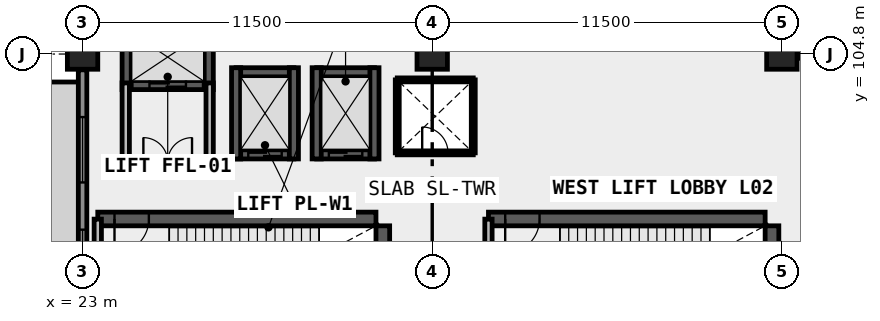
"""IFC4 building model, lengths in metres.
Left out: names, types, materials, properties, quantities, classifications, styles, units other than length and angle.
Written with IfcOpenShell. Run it as: python <this file> out.ifc"""

import sys

from ifc_helpers import new_model, si_unit, direction, frame, frame_2d, origin, origin_2d, place, context, subcontext, project, spatial, rectangle, extrude, element, fill, save


model = new_model("IFC4")
c1 = context("Model", 3, precision=1e-05, world=origin(), true_north=direction((0.0, 1.0)))
c2 = subcontext(c1, "Body", "Model", "MODEL_VIEW")
j1 = project(units=[si_unit("LENGTHUNIT", "METRE"), si_unit("PLANEANGLEUNIT", "RADIAN")], contexts=[c1])
p1 = place(None, origin())
s1 = spatial("IfcSite", under=j1, at=p1, CompositionType="ELEMENT")
p2 = place(p1, origin())
s2 = spatial("IfcBuilding", under=s1, at=p2, CompositionType="ELEMENT")
p3 = place(p2, frame((0.0, 0.0, 8.4)))
s3 = spatial("IfcBuildingStorey", under=s2, at=p3, CompositionType="ELEMENT", Elevation=8.4)
for number, where, z_axis, x_axis in (
    (1, (23.0, 104.8, 0.0), (0.0, 0.0, 1.0), (1.0, 0.0, 0.0)),
    (2, (34.5, 104.8, 0.0), (0.0, 0.0, 1.0), (1.0, 0.0, 0.0)),
    (3, (46.0, 104.8, 0.0), (0.0, 0.0, 1.0), (1.0, 0.0, 0.0)),
):
    element("IfcColumn", number, at=place(p3, frame(where, z_axis=z_axis, x_axis=x_axis)), inside=s3, PredefinedType="COLUMN", context=c2, shape_type="SweptSolid", body=[
        extrude(rectangle(XDim=1.0, YDim=1.0, at=origin_2d()), origin(), (0.0, 0.0, 1.0), 5.4),
    ])
p4 = place(p3, frame((24.45, 103.78, 0.0), z_axis=(0.0, 0.0, 1.0), x_axis=(1.0, 0.0, 0.0)))
e4 = element("IfcWall", 4, at=p4, inside=s3, PredefinedType="SHEAR", context=c2, shape_type="SweptSolid", body=[
    extrude(rectangle(XDim=2.7, YDim=0.3, at=frame_2d((1.35, 0.0))), origin(), (0.0, 0.0, 1.0), 5.4),
])
p5 = place(p4, frame((0.75, 0.0, 0.0)))
e5 = element("IfcOpeningElement", 5, at=p5, cuts=e4, PredefinedType="OPENING", context=c2, shape_type="SweptSolid", body=[
    extrude(rectangle(XDim=1.2, YDim=2.15, at=frame_2d((0.6, 1.075))), frame((0.0, 0.16, 0.0), z_axis=(0.0, -1.0, 0.0), x_axis=(1.0, 0.0, 0.0)), (0.0, 0.0, 1.0), 0.32),
])
for number, where, z_axis, x_axis in (
    (6, (24.45, 103.63, 0.0), (0.0, 0.0, 1.0), (0.0, 1.0, 0.0)),
    (7, (27.15, 103.63, 0.0), (0.0, 0.0, 1.0), (0.0, 1.0, 0.0)),
):
    element("IfcWall", number, at=place(p3, frame(where, z_axis=z_axis, x_axis=x_axis)), inside=s3, PredefinedType="SHEAR", context=c2, shape_type="SweptSolid", body=[
        extrude(rectangle(XDim=2.14, YDim=0.3, at=frame_2d((1.07, 0.0))), origin(), (0.0, 0.0, 1.0), 5.4),
    ])
p6 = place(p3, frame((28.05, 101.5, 0.0), z_axis=(0.0, 0.0, 1.0), x_axis=(1.0, 0.0, 0.0)))
e8 = element("IfcWall", 8, at=p6, inside=s3, PredefinedType="SHEAR", context=c2, shape_type="SweptSolid", body=[
    extrude(rectangle(XDim=1.9, YDim=0.3, at=frame_2d((0.95, 0.0))), origin(), (0.0, 0.0, 1.0), 5.4),
])
p7 = place(p6, frame((0.4, 0.0, 0.0)))
e9 = element("IfcOpeningElement", 9, at=p7, cuts=e8, PredefinedType="OPENING", context=c2, shape_type="SweptSolid", body=[
    extrude(rectangle(XDim=1.1, YDim=2.15, at=frame_2d((0.55, 1.075))), frame((0.0, 0.16, 0.0), z_axis=(0.0, -1.0, 0.0), x_axis=(1.0, 0.0, 0.0)), (0.0, 0.0, 1.0), 0.32),
])
p8 = place(p3, frame((28.05, 104.2, 0.0), z_axis=(0.0, 0.0, 1.0), x_axis=(1.0, 0.0, 0.0)))
e10 = element("IfcWall", 10, at=p8, inside=s3, PredefinedType="SHEAR", context=c2, shape_type="SweptSolid", body=[
    extrude(rectangle(XDim=1.9, YDim=0.3, at=frame_2d((0.95, 0.0))), origin(), (0.0, 0.0, 1.0), 5.4),
])
for number, where, z_axis, x_axis in (
    (11, (28.05, 101.35, 0.0), (0.0, 0.0, 1.0), (0.0, 1.0, 0.0)),
    (12, (29.95, 101.35, 0.0), (0.0, 0.0, 1.0), (0.0, 1.0, 0.0)),
):
    element("IfcWall", number, at=place(p3, frame(where, z_axis=z_axis, x_axis=x_axis)), inside=s3, PredefinedType="SHEAR", context=c2, shape_type="SweptSolid", body=[
        extrude(rectangle(XDim=3.0, YDim=0.3, at=frame_2d((1.5, 0.0))), origin(), (0.0, 0.0, 1.0), 5.4),
    ])
p9 = place(p3, frame((30.7, 101.5, 0.0), z_axis=(0.0, 0.0, 1.0), x_axis=(1.0, 0.0, 0.0)))
e13 = element("IfcWall", 13, at=p9, inside=s3, PredefinedType="SHEAR", context=c2, shape_type="SweptSolid", body=[
    extrude(rectangle(XDim=1.9, YDim=0.3, at=frame_2d((0.95, 0.0))), origin(), (0.0, 0.0, 1.0), 5.4),
])
p10 = place(p9, frame((0.4, 0.0, 0.0)))
e14 = element("IfcOpeningElement", 14, at=p10, cuts=e13, PredefinedType="OPENING", context=c2, shape_type="SweptSolid", body=[
    extrude(rectangle(XDim=1.1, YDim=2.15, at=frame_2d((0.55, 1.075))), frame((0.0, 0.16, 0.0), z_axis=(0.0, -1.0, 0.0), x_axis=(1.0, 0.0, 0.0)), (0.0, 0.0, 1.0), 0.32),
])
p11 = place(p3, frame((30.7, 104.2, 0.0), z_axis=(0.0, 0.0, 1.0), x_axis=(1.0, 0.0, 0.0)))
e15 = element("IfcWall", 15, at=p11, inside=s3, PredefinedType="SHEAR", context=c2, shape_type="SweptSolid", body=[
    extrude(rectangle(XDim=1.9, YDim=0.3, at=frame_2d((0.95, 0.0))), origin(), (0.0, 0.0, 1.0), 5.4),
])
for number, where, z_axis, x_axis in (
    (16, (30.7, 101.35, 0.0), (0.0, 0.0, 1.0), (0.0, 1.0, 0.0)),
    (17, (32.6, 101.35, 0.0), (0.0, 0.0, 1.0), (0.0, 1.0, 0.0)),
):
    element("IfcWall", number, at=place(p3, frame(where, z_axis=z_axis, x_axis=x_axis)), inside=s3, PredefinedType="SHEAR", context=c2, shape_type="SweptSolid", body=[
        extrude(rectangle(XDim=3.0, YDim=0.3, at=frame_2d((1.5, 0.0))), origin(), (0.0, 0.0, 1.0), 5.4),
    ])
p12 = place(p3, frame((23.5, 99.375, 0.0), z_axis=(0.0, 0.0, 1.0), x_axis=(1.0, 0.0, 0.0)))
e18 = element("IfcWall", 18, at=p12, inside=s3, PredefinedType="SHEAR", context=c2, shape_type="SweptSolid", body=[
    extrude(rectangle(XDim=9.15, YDim=0.45, at=frame_2d((4.575, 0.0))), origin(), (0.0, 0.0, 1.0), 5.4),
])
p13 = place(p12, frame((0.55, 0.0, 0.0)))
e19 = element("IfcOpeningElement", 19, at=p13, cuts=e18, PredefinedType="OPENING", context=c2, shape_type="SweptSolid", body=[
    extrude(rectangle(XDim=1.13, YDim=2.15, at=frame_2d((0.565, 1.075))), frame((0.0, 0.235, 0.0), z_axis=(0.0, -1.0, 0.0), x_axis=(1.0, 0.0, 0.0)), (0.0, 0.0, 1.0), 0.47),
])
p14 = place(p3, frame((32.875, 95.55, 0.0), z_axis=(0.0, 0.0, 1.0), x_axis=(0.0, 1.0, 0.0)))
e20 = element("IfcWall", 20, at=p14, inside=s3, PredefinedType="SHEAR", context=c2, shape_type="SweptSolid", body=[
    extrude(rectangle(XDim=3.6, YDim=0.45, at=frame_2d((1.8, 0.0))), origin(), (0.0, 0.0, 1.0), 5.4),
])
p15 = place(p3, frame((36.35, 99.375, 0.0), z_axis=(0.0, 0.0, 1.0), x_axis=(1.0, 0.0, 0.0)))
e21 = element("IfcWall", 21, at=p15, inside=s3, PredefinedType="SHEAR", context=c2, shape_type="SweptSolid", body=[
    extrude(rectangle(XDim=9.1, YDim=0.45, at=frame_2d((4.55, 0.0))), origin(), (0.0, 0.0, 1.0), 5.4),
])
p16 = place(p15, frame((0.55, 0.0, 0.0)))
e22 = element("IfcOpeningElement", 22, at=p16, cuts=e21, PredefinedType="OPENING", context=c2, shape_type="SweptSolid", body=[
    extrude(rectangle(XDim=1.13, YDim=2.15, at=frame_2d((0.565, 1.075))), frame((0.0, 0.235, 0.0), z_axis=(0.0, -1.0, 0.0), x_axis=(1.0, 0.0, 0.0)), (0.0, 0.0, 1.0), 0.47),
])
p17 = place(p3, frame((45.675, 95.32, 0.0), z_axis=(0.0, 0.0, 1.0), x_axis=(0.0, 1.0, 0.0)))
e23 = element("IfcWall", 23, at=p17, inside=s3, PredefinedType="SHEAR", context=c2, shape_type="SweptSolid", body=[
    extrude(rectangle(XDim=3.83, YDim=0.45, at=frame_2d((1.915, 0.0))), origin(), (0.0, 0.0, 1.0), 5.4),
])
p18 = place(p3, frame((46.52, 104.8, 0.0), z_axis=(0.0, 0.0, 1.0), x_axis=(1.0, 0.0, 0.0)))
e24 = element("IfcWall", 24, at=p18, inside=s3, PredefinedType="SOLIDWALL", context=c2, shape_type="SweptSolid", body=[
    extrude(rectangle(XDim=10.46, YDim=0.28, at=frame_2d((5.23, 0.0))), origin(), (0.0, 0.0, 1.0), 4.35),
])
p19 = place(p18, frame((1.002, 0.0, 0.85)))
e25 = element("IfcOpeningElement", 25, at=p19, cuts=e24, PredefinedType="OPENING", context=c2, shape_type="SweptSolid", body=[
    extrude(rectangle(XDim=2.15, YDim=1.95, at=frame_2d((1.075, 0.975))), frame((0.0, 0.15, 0.0), z_axis=(0.0, -1.0, 0.0), x_axis=(1.0, 0.0, 0.0)), (0.0, 0.0, 1.0), 0.3),
])
p20 = place(p18, frame((4.155, 0.0, 0.85)))
e26 = element("IfcOpeningElement", 26, at=p20, cuts=e24, PredefinedType="OPENING", context=c2, shape_type="SweptSolid", body=[
    extrude(rectangle(XDim=2.15, YDim=1.95, at=frame_2d((1.075, 0.975))), frame((0.0, 0.15, 0.0), z_axis=(0.0, -1.0, 0.0), x_axis=(1.0, 0.0, 0.0)), (0.0, 0.0, 1.0), 0.3),
])
p21 = place(p18, frame((7.308, 0.0, 0.85)))
e27 = element("IfcOpeningElement", 27, at=p21, cuts=e24, PredefinedType="OPENING", context=c2, shape_type="SweptSolid", body=[
    extrude(rectangle(XDim=2.15, YDim=1.95, at=frame_2d((1.075, 0.975))), frame((0.0, 0.15, 0.0), z_axis=(0.0, -1.0, 0.0), x_axis=(1.0, 0.0, 0.0)), (0.0, 0.0, 1.0), 0.3),
])
p22 = place(p3, frame((23.0, 95.32, 0.0), z_axis=(0.0, 0.0, 1.0), x_axis=(0.0, 1.0, 0.0)))
e28 = element("IfcWall", 28, at=p22, inside=s3, PredefinedType="SOLIDWALL", context=c2, shape_type="SweptSolid", body=[
    extrude(rectangle(XDim=8.96, YDim=0.28, at=frame_2d((4.48, 0.0))), origin(), (0.0, 0.0, 1.0), 4.35),
])
p23 = place(p22, frame((1.553, 0.0, 0.85)))
e29 = element("IfcOpeningElement", 29, at=p23, cuts=e28, PredefinedType="OPENING", context=c2, shape_type="SweptSolid", body=[
    extrude(rectangle(XDim=2.15, YDim=1.95, at=frame_2d((1.075, 0.975))), frame((0.0, 0.15, 0.0), z_axis=(0.0, -1.0, 0.0), x_axis=(1.0, 0.0, 0.0)), (0.0, 0.0, 1.0), 0.3),
])
p24 = place(p22, frame((5.257, 0.0, 0.85)))
e30 = element("IfcOpeningElement", 30, at=p24, cuts=e28, PredefinedType="OPENING", context=c2, shape_type="SweptSolid", body=[
    extrude(rectangle(XDim=2.15, YDim=1.95, at=frame_2d((1.075, 0.975))), frame((0.0, 0.15, 0.0), z_axis=(0.0, -1.0, 0.0), x_axis=(1.0, 0.0, 0.0)), (0.0, 0.0, 1.0), 0.3),
])
p25 = place(p3, frame((23.5, 95.33, 0.0), z_axis=(0.0, 0.0, 1.0), x_axis=(0.0, 1.0, 0.0)))
e31 = element("IfcWall", 31, at=p25, inside=s3, PredefinedType="SOLIDWALL", context=c2, shape_type="SweptSolid", body=[
    extrude(rectangle(XDim=4.04, YDim=0.24, at=frame_2d((2.02, 0.0))), origin(), (0.0, 0.0, 1.0), 5.12),
])
p26 = place(p25, frame((1.45, 0.0, 0.0)))
e32 = element("IfcOpeningElement", 32, at=p26, cuts=e31, PredefinedType="OPENING", context=c2, shape_type="SweptSolid", body=[
    extrude(rectangle(XDim=1.13, YDim=2.15, at=frame_2d((0.565, 1.075))), frame((0.0, 0.13, 0.0), z_axis=(0.0, -1.0, 0.0), x_axis=(1.0, 0.0, 0.0)), (0.0, 0.0, 1.0), 0.26),
])
p27 = place(p3, frame((36.35, 95.33, 0.0), z_axis=(0.0, 0.0, 1.0), x_axis=(0.0, 1.0, 0.0)))
e33 = element("IfcWall", 33, at=p27, inside=s3, PredefinedType="SOLIDWALL", context=c2, shape_type="SweptSolid", body=[
    extrude(rectangle(XDim=4.04, YDim=0.24, at=frame_2d((2.02, 0.0))), origin(), (0.0, 0.0, 1.0), 5.12),
])
p28 = place(p27, frame((1.45, 0.0, 0.0)))
e34 = element("IfcOpeningElement", 34, at=p28, cuts=e33, PredefinedType="OPENING", context=c2, shape_type="SweptSolid", body=[
    extrude(rectangle(XDim=1.13, YDim=2.15, at=frame_2d((0.565, 1.075))), frame((0.0, 0.13, 0.0), z_axis=(0.0, -1.0, 0.0), x_axis=(1.0, 0.0, 0.0)), (0.0, 0.0, 1.0), 0.26),
])
p29 = place(p3, frame((24.42, 101.25, 0.0), z_axis=(0.0, 0.0, 1.0), x_axis=(1.0, 0.0, 0.0)))
e35 = element("IfcWall", 35, at=p29, inside=s3, PredefinedType="SOLIDWALL", context=c2, shape_type="SweptSolid", body=[
    extrude(rectangle(XDim=2.76, YDim=0.24, at=frame_2d((1.38, 0.0))), origin(), (0.0, 0.0, 1.0), 5.12),
])
p30 = place(p29, frame((0.58, 0.0, 0.0)))
e36 = element("IfcOpeningElement", 36, at=p30, cuts=e35, PredefinedType="OPENING", context=c2, shape_type="SweptSolid", body=[
    extrude(rectangle(XDim=1.6, YDim=2.15, at=frame_2d((0.8, 1.075))), frame((0.0, 0.13, 0.0), z_axis=(0.0, -1.0, 0.0), x_axis=(1.0, 0.0, 0.0)), (0.0, 0.0, 1.0), 0.26),
])
for number, where, z_axis, x_axis in (
    (37, (24.42, 101.25, 0.0), (0.0, 0.0, 1.0), (0.0, 1.0, 0.0)),
    (38, (27.18, 101.25, 0.0), (0.0, 0.0, 1.0), (0.0, 1.0, 0.0)),
):
    element("IfcWall", number, at=place(p3, frame(where, z_axis=z_axis, x_axis=x_axis)), inside=s3, PredefinedType="SOLIDWALL", context=c2, shape_type="SweptSolid", body=[
        extrude(rectangle(XDim=2.6, YDim=0.24, at=frame_2d((1.3, 0.0))), origin(), (0.0, 0.0, 1.0), 5.12),
    ])
p31 = place(p3, frame((33.35, 101.55, 0.0), z_axis=(0.0, 0.0, 1.0), x_axis=(1.0, 0.0, 0.0)))
e39 = element("IfcWall", 39, at=p31, inside=s3, PredefinedType="PLUMBINGWALL", context=c2, shape_type="SweptSolid", body=[
    extrude(rectangle(XDim=2.5, YDim=0.13, at=frame_2d((1.25, 0.0))), origin(), (0.0, 0.0, 1.0), 5.12),
])
p32 = place(p31, frame((0.82, 0.0, 0.0)))
e40 = element("IfcOpeningElement", 40, at=p32, cuts=e39, PredefinedType="OPENING", context=c2, shape_type="SweptSolid", body=[
    extrude(rectangle(XDim=0.85, YDim=2.0, at=frame_2d((0.425, 1.0))), frame((0.0, 0.075, 0.0), z_axis=(0.0, -1.0, 0.0), x_axis=(1.0, 0.0, 0.0)), (0.0, 0.0, 1.0), 0.15),
])
for number, where, z_axis, x_axis in (
    (41, (33.35, 101.55, 0.0), (0.0, 0.0, 1.0), (0.0, 1.0, 0.0)),
    (42, (35.85, 101.55, 0.0), (0.0, 0.0, 1.0), (0.0, 1.0, 0.0)),
):
    element("IfcWall", number, at=place(p3, frame(where, z_axis=z_axis, x_axis=x_axis)), inside=s3, PredefinedType="PLUMBINGWALL", context=c2, shape_type="SweptSolid", body=[
        extrude(rectangle(XDim=2.4, YDim=0.13, at=frame_2d((1.2, 0.0))), origin(), (0.0, 0.0, 1.0), 5.12),
    ])
p33 = place(p3, frame((33.35, 103.95, 0.0), z_axis=(0.0, 0.0, 1.0), x_axis=(1.0, 0.0, 0.0)))
e43 = element("IfcWall", 43, at=p33, inside=s3, PredefinedType="PLUMBINGWALL", context=c2, shape_type="SweptSolid", body=[
    extrude(rectangle(XDim=2.5, YDim=0.13, at=frame_2d((1.25, 0.0))), origin(), (0.0, 0.0, 1.0), 5.12),
])
p34 = place(p23, origin())
e44 = element("IfcWindow", 44, at=p34, inside=s3, PartitioningType="SINGLE_PANEL", PredefinedType="WINDOW", context=c2, shape_type="SweptSolid", body=[
    extrude(rectangle(XDim=2.15, YDim=1.95, at=frame_2d((1.075, 0.975))), frame((0.0, 0.03, 0.0), z_axis=(0.0, -1.0, 0.0), x_axis=(1.0, 0.0, 0.0)), (0.0, 0.0, 1.0), 0.06),
])
fill(e29, e44)
p35 = place(p24, origin())
e45 = element("IfcWindow", 45, at=p35, inside=s3, PartitioningType="SINGLE_PANEL", PredefinedType="WINDOW", context=c2, shape_type="SweptSolid", body=[
    extrude(rectangle(XDim=2.15, YDim=1.95, at=frame_2d((1.075, 0.975))), frame((0.0, 0.03, 0.0), z_axis=(0.0, -1.0, 0.0), x_axis=(1.0, 0.0, 0.0)), (0.0, 0.0, 1.0), 0.06),
])
fill(e30, e45)
p36 = place(p5, origin())
e46 = element("IfcDoor", 46, at=p36, inside=s3, OperationType="SLIDING_TO_RIGHT", PredefinedType="DOOR", context=c2, shape_type="SweptSolid", body=[
    extrude(rectangle(XDim=1.2, YDim=2.15, at=frame_2d((0.6, 1.075))), frame((0.0, 0.025, 0.0), z_axis=(0.0, -1.0, 0.0), x_axis=(1.0, 0.0, 0.0)), (0.0, 0.0, 1.0), 0.05),
])
fill(e5, e46)
p37 = place(p7, origin())
e47 = element("IfcDoor", 47, at=p37, inside=s3, OperationType="SLIDING_TO_LEFT", PredefinedType="DOOR", context=c2, shape_type="SweptSolid", body=[
    extrude(rectangle(XDim=1.1, YDim=2.15, at=frame_2d((0.55, 1.075))), frame((0.0, 0.025, 0.0), z_axis=(0.0, -1.0, 0.0), x_axis=(1.0, 0.0, 0.0)), (0.0, 0.0, 1.0), 0.05),
])
fill(e9, e47)
p38 = place(p10, origin())
e48 = element("IfcDoor", 48, at=p38, inside=s3, OperationType="SLIDING_TO_LEFT", PredefinedType="DOOR", context=c2, shape_type="SweptSolid", body=[
    extrude(rectangle(XDim=1.1, YDim=2.15, at=frame_2d((0.55, 1.075))), frame((0.0, 0.025, 0.0), z_axis=(0.0, -1.0, 0.0), x_axis=(1.0, 0.0, 0.0)), (0.0, 0.0, 1.0), 0.05),
])
fill(e14, e48)
p39 = place(p13, frame((0.565, 0.0, 0.0), z_axis=(0.0, 0.0, 1.0), x_axis=(-1.0, 0.0, 0.0)))
e49 = element("IfcDoor", 49, at=p39, inside=s3, OperationType="SINGLE_SWING_LEFT", PredefinedType="DOOR", context=c2, shape_type="SweptSolid", body=[
    extrude(rectangle(XDim=1.13, YDim=2.15, at=frame_2d((0.0, 1.075))), frame((0.0, 0.025, 0.0), z_axis=(0.0, -1.0, 0.0), x_axis=(1.0, 0.0, 0.0)), (0.0, 0.0, 1.0), 0.05),
])
fill(e19, e49)
p40 = place(p16, frame((0.565, 0.0, 0.0), z_axis=(0.0, 0.0, 1.0), x_axis=(-1.0, 0.0, 0.0)))
e50 = element("IfcDoor", 50, at=p40, inside=s3, OperationType="SINGLE_SWING_LEFT", PredefinedType="DOOR", context=c2, shape_type="SweptSolid", body=[
    extrude(rectangle(XDim=1.13, YDim=2.15, at=frame_2d((0.0, 1.075))), frame((0.0, 0.025, 0.0), z_axis=(0.0, -1.0, 0.0), x_axis=(1.0, 0.0, 0.0)), (0.0, 0.0, 1.0), 0.05),
])
fill(e22, e50)
p41 = place(p30, origin())
e51 = element("IfcDoor", 51, at=p41, inside=s3, OperationType="DOUBLE_DOOR_SINGLE_SWING", PredefinedType="DOOR", context=c2, shape_type="SweptSolid", body=[
    extrude(rectangle(XDim=1.6, YDim=2.15, at=frame_2d((0.8, 1.075))), frame((0.0, 0.025, 0.0), z_axis=(0.0, -1.0, 0.0), x_axis=(1.0, 0.0, 0.0)), (0.0, 0.0, 1.0), 0.05),
])
fill(e36, e51)
p42 = place(p32, origin())
e52 = element("IfcDoor", 52, at=p42, inside=s3, OperationType="SINGLE_SWING_LEFT", PredefinedType="TRAPDOOR", context=c2, shape_type="SweptSolid", body=[
    extrude(rectangle(XDim=0.85, YDim=2.0, at=frame_2d((0.425, 1.0))), frame((0.0, 0.025, 0.0), z_axis=(0.0, -1.0, 0.0), x_axis=(1.0, 0.0, 0.0)), (0.0, 0.0, 1.0), 0.05),
])
fill(e40, e52)
save(model, sys.argv[1])
